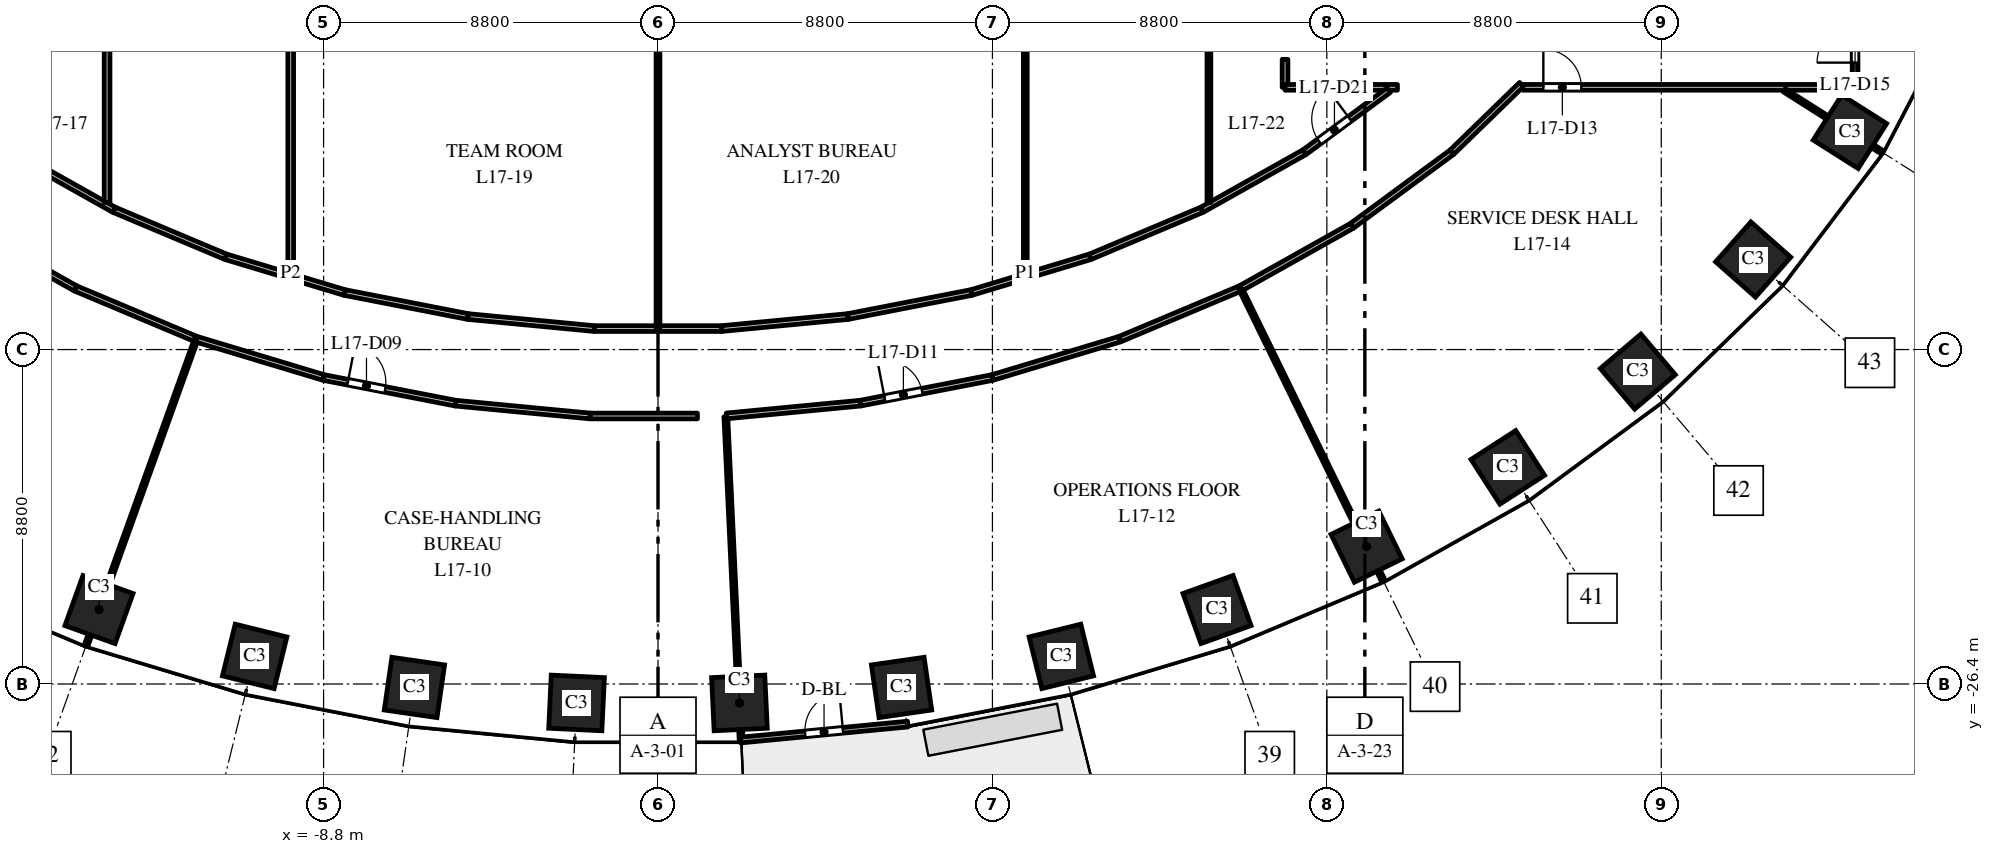
"""IFC4 building model, lengths in metres.
Left out: names, types, materials, properties, quantities, classifications, styles, units other than length and angle.
Written with IfcOpenShell. Run it as: python <this file> out.ifc"""

import sys

from ifc_helpers import new_model, si_unit, direction, frame, frame_2d, origin, origin_2d, place, context, subcontext, project, spatial, rectangle, extrude, element, fill, save


model = new_model("IFC4")
c1 = context("Model", 3, precision=1e-05, world=origin(), true_north=direction((0.0, 1.0)))
c2 = subcontext(c1, "Body", "Model", "MODEL_VIEW")
j1 = project(units=[si_unit("LENGTHUNIT", "METRE"), si_unit("PLANEANGLEUNIT", "RADIAN")], contexts=[c1])
p1 = place(None, origin())
s1 = spatial("IfcSite", under=j1, at=p1, CompositionType="ELEMENT")
p2 = place(p1, origin())
s2 = spatial("IfcBuilding", under=s1, at=p2, CompositionType="ELEMENT")
p3 = place(p2, frame((0.0, 0.0, 78.5)))
s3 = spatial("IfcBuildingStorey", under=s2, at=p3, CompositionType="ELEMENT", Elevation=78.5)
for number, where, z_axis, x_axis in (
    (1, (-14.709, -24.441, 0.0), (0.0, 0.0, 1.0), (0.941, -0.338, 0.0)),
    (2, (-10.613, -25.674, 0.0), (0.0, 0.0, 1.0), (0.971, -0.24, 0.0)),
    (3, (-6.409, -26.491, 0.0), (0.0, 0.0, 1.0), (0.99, -0.143, 0.0)),
    (4, (-2.143, -26.898, 0.0), (0.0, 0.0, 1.0), (0.999, -0.048, 0.0)),
    (5, (2.143, -26.898, 0.0), (0.0, 0.0, 1.0), (0.999, 0.048, 0.0)),
    (6, (6.409, -26.491, 0.0), (0.0, 0.0, 1.0), (0.99, 0.143, 0.0)),
    (7, (10.613, -25.674, 0.0), (0.0, 0.0, 1.0), (0.971, 0.24, 0.0)),
    (8, (14.709, -24.441, 0.0), (0.0, 0.0, 1.0), (0.941, 0.338, 0.0)),
    (9, (18.646, -22.785, 0.0), (0.0, 0.0, 1.0), (0.898, 0.439, 0.0)),
    (10, (22.362, -20.7, 0.0), (0.0, 0.0, 1.0), (0.84, 0.542, 0.0)),
    (11, (25.783, -18.18, 0.0), (0.0, 0.0, 1.0), (0.763, 0.646, 0.0)),
    (12, (28.819, -15.23, 0.0), (0.0, 0.0, 1.0), (0.663, 0.749, 0.0)),
    (13, (31.365, -11.871, 0.0), (0.0, 0.0, 1.0), (0.535, 0.845, 0.0)),
):
    element("IfcColumn", number, at=place(p3, frame(where, z_axis=z_axis, x_axis=x_axis)), inside=s3, PredefinedType="COLUMN", context=c2, shape_type="SweptSolid", body=[
        extrude(rectangle(XDim=1.4, YDim=1.4, at=origin_2d()), origin(), (0.0, 0.0, 1.0), 4.0),
    ])
p4 = place(p3, frame((2.166, -27.875, 0.0), z_axis=(0.0, 0.0, 1.0), x_axis=(0.995473879823, 0.095035543824, 0.0)))
e14 = element("IfcWall", 14, at=p4, inside=s3, PredefinedType="STANDARD", context=c2, shape_type="SweptSolid", body=[
    extrude(rectangle(XDim=4.426, YDim=0.15, at=frame_2d((2.213, 0.0))), origin(), (0.0, 0.0, 1.0), 3.7),
])
p5 = place(p4, frame((1.713, 0.0, 0.0)))
e15 = element("IfcOpeningElement", 15, at=p5, cuts=e14, PredefinedType="OPENING", context=c2, shape_type="SweptSolid", body=[
    extrude(rectangle(XDim=1.0, YDim=2.4, at=frame_2d((0.5, 1.2))), frame((0.0, 0.085, 0.0), z_axis=(0.0, -1.0, 0.0), x_axis=(1.0, 0.0, 0.0)), (0.0, 0.0, 1.0), 0.17),
])
p6 = place(p3, frame((-18.26, -14.344, 0.0), z_axis=(0.0, 0.0, 1.0), x_axis=(0.871958798398, -0.489579262118, 0.0)))
e16 = element("IfcWall", 16, at=p6, inside=s3, PredefinedType="PARTITIONING", context=c2, shape_type="SweptSolid", body=[
    extrude(rectangle(XDim=3.366, YDim=0.15, at=frame_2d((1.683, 0.0))), origin(), (0.0, 0.0, 1.0), 3.7),
])
p7 = place(p3, frame((-17.01, -12.408, 0.0), z_axis=(0.0, 0.0, 1.0), x_axis=(0.871977874087, -0.489545286059, 0.0)))
e17 = element("IfcWall", 17, at=p7, inside=s3, PredefinedType="PARTITIONING", context=c2, shape_type="SweptSolid", body=[
    extrude(rectangle(XDim=3.093, YDim=0.15, at=frame_2d((1.546, 0.0))), origin(), (0.0, 0.0, 1.0), 3.7),
])
p8 = place(p3, frame((-15.325, -15.992, 0.0), z_axis=(0.0, 0.0, 1.0), x_axis=(0.921891448612, -0.387448263612, 0.0)))
e18 = element("IfcWall", 18, at=p8, inside=s3, PredefinedType="PARTITIONING", context=c2, shape_type="SweptSolid", body=[
    extrude(rectangle(XDim=3.443, YDim=0.15, at=frame_2d((1.722, 0.0))), origin(), (0.0, 0.0, 1.0), 2.85),
])
p9 = place(p3, frame((-15.048, -25.383, 0.0), z_axis=(0.0, 0.0, 1.0), x_axis=(0.338300183564, 0.941038248851, 0.0)))
e19 = element("IfcWall", 19, at=p9, inside=s3, PredefinedType="PARTITIONING", context=c2, shape_type="SweptSolid", body=[
    extrude(rectangle(XDim=8.558, YDim=0.1, at=frame_2d((4.279, 0.0))), origin(), (0.0, 0.0, 1.0), 2.85),
])
p10 = place(p3, frame((-14.497, -13.729, 0.0), z_axis=(0.0, 0.0, 1.0), x_axis=(0.0, 1.0, 0.0)))
e20 = element("IfcWall", 20, at=p10, inside=s3, PredefinedType="PARTITIONING", context=c2, shape_type="SweptSolid", body=[
    extrude(rectangle(XDim=4.654, YDim=0.15, at=frame_2d((2.327, 0.0))), origin(), (0.0, 0.0, 1.0), 2.75),
])
p11 = place(p3, frame((-14.313, -13.922, 0.0), z_axis=(0.0, 0.0, 1.0), x_axis=(0.921799502591, -0.387666966638, 0.0)))
e21 = element("IfcWall", 21, at=p11, inside=s3, PredefinedType="PARTITIONING", context=c2, shape_type="SweptSolid", body=[
    extrude(rectangle(XDim=3.19, YDim=0.15, at=frame_2d((1.595, 0.0))), origin(), (0.0, 0.0, 1.0), 2.85),
])
p12 = place(p3, frame((-12.151, -17.326, 0.0), z_axis=(0.0, 0.0, 1.0), x_axis=(0.957528149021, -0.288339806186, 0.0)))
e22 = element("IfcWall", 22, at=p12, inside=s3, PredefinedType="PARTITIONING", context=c2, shape_type="SweptSolid", body=[
    extrude(rectangle(XDim=3.5, YDim=0.15, at=frame_2d((1.75, 0.0))), origin(), (0.0, 0.0, 1.0), 3.7),
])
p13 = place(p3, frame((-11.372, -15.159, 0.0), z_axis=(0.0, 0.0, 1.0), x_axis=(0.95757464185, -0.28818536619, 0.0)))
e23 = element("IfcWall", 23, at=p13, inside=s3, PredefinedType="PARTITIONING", context=c2, shape_type="SweptSolid", body=[
    extrude(rectangle(XDim=3.262, YDim=0.15, at=frame_2d((1.631, 0.0))), origin(), (0.0, 0.0, 1.0), 3.7),
])
p14 = place(p3, frame((-9.665, -15.591, 0.0), z_axis=(0.0, 0.0, 1.0), x_axis=(0.0, 1.0, 0.0)))
e24 = element("IfcWall", 24, at=p14, inside=s3, PredefinedType="PARTITIONING", context=c2, shape_type="SweptSolid", body=[
    extrude(rectangle(XDim=31.182, YDim=0.15, at=frame_2d((15.591, 0.0))), origin(), (0.0, 0.0, 1.0), 2.75),
])
p15 = place(p14, frame((29.572, 0.0, 0.0)))
e25 = element("IfcOpeningElement", 25, at=p15, cuts=e24, PredefinedType="OPENING", context=c2, shape_type="SweptSolid", body=[
    extrude(rectangle(XDim=1.0, YDim=2.1, at=frame_2d((0.5, 1.05))), frame((0.0, 0.085, 0.0), z_axis=(0.0, -1.0, 0.0), x_axis=(1.0, 0.0, 0.0)), (0.0, 0.0, 1.0), 0.17),
])
p16 = place(p3, frame((-8.8, -18.335, 0.0), z_axis=(0.0, 0.0, 1.0), x_axis=(0.981620418387, -0.190843795306, 0.0)))
e26 = element("IfcWall", 26, at=p16, inside=s3, PredefinedType="PARTITIONING", context=c2, shape_type="SweptSolid", body=[
    extrude(rectangle(XDim=3.537, YDim=0.15, at=frame_2d((1.769, 0.0))), origin(), (0.0, 0.0, 1.0), 2.85),
])
p17 = place(p16, frame((0.65, 0.0, 0.0)))
e27 = element("IfcOpeningElement", 27, at=p17, cuts=e26, PredefinedType="OPENING", context=c2, shape_type="SweptSolid", body=[
    extrude(rectangle(XDim=1.0, YDim=2.1, at=frame_2d((0.5, 1.05))), frame((0.0, 0.085, 0.0), z_axis=(0.0, -1.0, 0.0), x_axis=(1.0, 0.0, 0.0)), (0.0, 0.0, 1.0), 0.17),
])
p18 = place(p3, frame((-8.248, -16.099, 0.0), z_axis=(0.0, 0.0, 1.0), x_axis=(0.981621529558, -0.190838079815, 0.0)))
e28 = element("IfcWall", 28, at=p18, inside=s3, PredefinedType="PARTITIONING", context=c2, shape_type="SweptSolid", body=[
    extrude(rectangle(XDim=3.311, YDim=0.15, at=frame_2d((1.655, 0.0))), origin(), (0.0, 0.0, 1.0), 2.85),
])
p19 = place(p3, frame((-5.328, -19.01, 0.0), z_axis=(0.0, 0.0, 1.0), x_axis=(0.995485604231, -0.094912653366, 0.0)))
e29 = element("IfcWall", 29, at=p19, inside=s3, PredefinedType="PARTITIONING", context=c2, shape_type="SweptSolid", body=[
    extrude(rectangle(XDim=3.56, YDim=0.15, at=frame_2d((1.78, 0.0))), origin(), (0.0, 0.0, 1.0), 3.7),
])
p20 = place(p3, frame((-4.998, -16.731, 0.0), z_axis=(0.0, 0.0, 1.0), x_axis=(0.995479356205, -0.094978162593, 0.0)))
e30 = element("IfcWall", 30, at=p20, inside=s3, PredefinedType="PARTITIONING", context=c2, shape_type="SweptSolid", body=[
    extrude(rectangle(XDim=3.339, YDim=0.15, at=frame_2d((1.669, 0.0))), origin(), (0.0, 0.0, 1.0), 3.7),
])
p21 = place(p3, frame((-1.784, -19.348, 0.0), z_axis=(0.0, 0.0, 1.0), x_axis=(1.0, 0.0, 0.0)))
e31 = element("IfcWall", 31, at=p21, inside=s3, PredefinedType="PARTITIONING", context=c2, shape_type="SweptSolid", body=[
    extrude(rectangle(XDim=2.821, YDim=0.15, at=frame_2d((1.411, 0.0))), origin(), (0.0, 0.0, 1.0), 2.85),
])
p22 = place(p3, frame((-1.674, -17.048, 0.0), z_axis=(0.0, 0.0, 1.0), x_axis=(1.0, 0.0, 0.0)))
e32 = element("IfcWall", 32, at=p22, inside=s3, PredefinedType="PARTITIONING", context=c2, shape_type="SweptSolid", body=[
    extrude(rectangle(XDim=1.654, YDim=0.15, at=frame_2d((0.827, 0.0))), origin(), (0.0, 0.0, 1.0), 2.85),
])
p23 = place(p3, frame((0.0, -17.048, 0.0), z_axis=(0.0, 0.0, 1.0), x_axis=(1.0, 0.0, 0.0)))
e33 = element("IfcWall", 33, at=p23, inside=s3, PredefinedType="PARTITIONING", context=c2, shape_type="SweptSolid", body=[
    extrude(rectangle(XDim=1.674, YDim=0.15, at=frame_2d((0.837, 0.0))), origin(), (0.0, 0.0, 1.0), 3.7),
])
p24 = place(p3, frame((0.0, -17.044, 0.0), z_axis=(0.0, 0.0, 1.0), x_axis=(0.0, 1.0, 0.0)))
e34 = element("IfcWall", 34, at=p24, inside=s3, PredefinedType="PARTITIONING", context=c2, shape_type="SweptSolid", body=[
    extrude(rectangle(XDim=9.54, YDim=0.1, at=frame_2d((4.77, 0.0))), origin(), (0.0, 0.0, 1.0), 3.7),
])
p25 = place(p3, frame((1.674, -17.048, 0.0), z_axis=(0.0, 0.0, 1.0), x_axis=(0.995479356205, 0.094978162593, 0.0)))
e35 = element("IfcWall", 35, at=p25, inside=s3, PredefinedType="PARTITIONING", context=c2, shape_type="SweptSolid", body=[
    extrude(rectangle(XDim=3.339, YDim=0.15, at=frame_2d((1.669, 0.0))), origin(), (0.0, 0.0, 1.0), 2.85),
])
p26 = place(p3, frame((1.785, -19.366, 0.0), z_axis=(0.0, 0.0, 1.0), x_axis=(0.047190335266, -0.998885915537, 0.0)))
e36 = element("IfcWall", 36, at=p26, inside=s3, PredefinedType="PARTITIONING", context=c2, shape_type="SweptSolid", body=[
    extrude(rectangle(XDim=8.542, YDim=0.1, at=frame_2d((4.271, 0.0))), origin(), (0.0, 0.0, 1.0), 2.85),
])
p27 = place(p3, frame((1.804, -19.346, 0.0), z_axis=(0.0, 0.0, 1.0), x_axis=(0.99548678928, 0.094900223226, 0.0)))
e37 = element("IfcWall", 37, at=p27, inside=s3, PredefinedType="PARTITIONING", context=c2, shape_type="SweptSolid", body=[
    extrude(rectangle(XDim=3.54, YDim=0.15, at=frame_2d((1.77, 0.0))), origin(), (0.0, 0.0, 1.0), 2.85),
])
p28 = place(p3, frame((4.998, -16.731, 0.0), z_axis=(0.0, 0.0, 1.0), x_axis=(0.981621529558, 0.190838079815, 0.0)))
e38 = element("IfcWall", 38, at=p28, inside=s3, PredefinedType="PARTITIONING", context=c2, shape_type="SweptSolid", body=[
    extrude(rectangle(XDim=3.311, YDim=0.15, at=frame_2d((1.655, 0.0))), origin(), (0.0, 0.0, 1.0), 3.7),
])
p29 = place(p3, frame((5.328, -19.01, 0.0), z_axis=(0.0, 0.0, 1.0), x_axis=(0.981620418387, 0.190843795306, 0.0)))
e39 = element("IfcWall", 39, at=p29, inside=s3, PredefinedType="PARTITIONING", context=c2, shape_type="SweptSolid", body=[
    extrude(rectangle(XDim=3.537, YDim=0.15, at=frame_2d((1.769, 0.0))), origin(), (0.0, 0.0, 1.0), 3.7),
])
p30 = place(p29, frame((0.65, 0.0, 0.0)))
e40 = element("IfcOpeningElement", 40, at=p30, cuts=e39, PredefinedType="OPENING", context=c2, shape_type="SweptSolid", body=[
    extrude(rectangle(XDim=1.0, YDim=2.1, at=frame_2d((0.5, 1.05))), frame((0.0, 0.085, 0.0), z_axis=(0.0, -1.0, 0.0), x_axis=(1.0, 0.0, 0.0)), (0.0, 0.0, 1.0), 0.17),
])
p31 = place(p3, frame((8.248, -16.099, 0.0), z_axis=(0.0, 0.0, 1.0), x_axis=(0.95757464185, 0.28818536619, 0.0)))
e41 = element("IfcWall", 41, at=p31, inside=s3, PredefinedType="PARTITIONING", context=c2, shape_type="SweptSolid", body=[
    extrude(rectangle(XDim=3.262, YDim=0.15, at=frame_2d((1.631, 0.0))), origin(), (0.0, 0.0, 1.0), 2.85),
])
p32 = place(p3, frame((8.8, -18.335, 0.0), z_axis=(0.0, 0.0, 1.0), x_axis=(0.957528149021, 0.288339806186, 0.0)))
e42 = element("IfcWall", 42, at=p32, inside=s3, PredefinedType="PARTITIONING", context=c2, shape_type="SweptSolid", body=[
    extrude(rectangle(XDim=3.5, YDim=0.15, at=frame_2d((1.75, 0.0))), origin(), (0.0, 0.0, 1.0), 2.85),
])
p33 = place(p3, frame((9.665, -15.591, 0.0), z_axis=(0.0, 0.0, 1.0), x_axis=(0.0, 1.0, 0.0)))
e43 = element("IfcWall", 43, at=p33, inside=s3, PredefinedType="PARTITIONING", context=c2, shape_type="SweptSolid", body=[
    extrude(rectangle(XDim=31.182, YDim=0.1, at=frame_2d((15.591, 0.0))), origin(), (0.0, 0.0, 1.0), 2.75),
])
p34 = place(p3, frame((11.372, -15.159, 0.0), z_axis=(0.0, 0.0, 1.0), x_axis=(0.921799502591, 0.387666966638, 0.0)))
e44 = element("IfcWall", 44, at=p34, inside=s3, PredefinedType="PARTITIONING", context=c2, shape_type="SweptSolid", body=[
    extrude(rectangle(XDim=3.19, YDim=0.15, at=frame_2d((1.595, 0.0))), origin(), (0.0, 0.0, 1.0), 3.7),
])
p35 = place(p3, frame((12.151, -17.326, 0.0), z_axis=(0.0, 0.0, 1.0), x_axis=(0.921891448612, 0.387448263612, 0.0)))
e45 = element("IfcWall", 45, at=p35, inside=s3, PredefinedType="PARTITIONING", context=c2, shape_type="SweptSolid", body=[
    extrude(rectangle(XDim=3.443, YDim=0.15, at=frame_2d((1.722, 0.0))), origin(), (0.0, 0.0, 1.0), 3.7),
])
p36 = place(p3, frame((14.313, -13.922, 0.0), z_axis=(0.0, 0.0, 1.0), x_axis=(0.871977874087, 0.489545286059, 0.0)))
e46 = element("IfcWall", 46, at=p36, inside=s3, PredefinedType="PARTITIONING", context=c2, shape_type="SweptSolid", body=[
    extrude(rectangle(XDim=3.093, YDim=0.15, at=frame_2d((1.546, 0.0))), origin(), (0.0, 0.0, 1.0), 3.7),
])
p37 = place(p3, frame((14.497, -13.729, 0.0), z_axis=(0.0, 0.0, 1.0), x_axis=(0.0, 1.0, 0.0)))
e47 = element("IfcWall", 47, at=p37, inside=s3, PredefinedType="PARTITIONING", context=c2, shape_type="SweptSolid", body=[
    extrude(rectangle(XDim=4.654, YDim=0.1, at=frame_2d((2.327, 0.0))), origin(), (0.0, 0.0, 1.0), 3.7),
])
p38 = place(p3, frame((15.326, -15.995, 0.0), z_axis=(0.0, 0.0, 1.0), x_axis=(0.439255658574, -0.898362102056, 0.0)))
e48 = element("IfcWall", 48, at=p38, inside=s3, PredefinedType="PARTITIONING", context=c2, shape_type="SweptSolid", body=[
    extrude(rectangle(XDim=8.56, YDim=0.1, at=frame_2d((4.28, 0.0))), origin(), (0.0, 0.0, 1.0), 2.85),
])
p39 = place(p3, frame((15.342, -15.982, 0.0), z_axis=(0.0, 0.0, 1.0), x_axis=(0.872011649609, 0.48948512025, 0.0)))
e49 = element("IfcWall", 49, at=p39, inside=s3, PredefinedType="PARTITIONING", context=c2, shape_type="SweptSolid", body=[
    extrude(rectangle(XDim=3.346, YDim=0.15, at=frame_2d((1.673, 0.0))), origin(), (0.0, 0.0, 1.0), 3.7),
])
p40 = place(p3, frame((16.5, -10.7, 0.0), z_axis=(0.0, 0.0, 1.0), x_axis=(0.0, 1.0, 0.0)))
e50 = element("IfcWall", 50, at=p40, inside=s3, PredefinedType="PARTITIONING", context=c2, shape_type="SweptSolid", body=[
    extrude(rectangle(XDim=0.736, YDim=0.15, at=frame_2d((0.368, 0.0))), origin(), (0.0, 0.0, 1.0), 3.7),
])
p41 = place(p3, frame((16.5, -10.7, 0.0), z_axis=(0.0, 0.0, 1.0), x_axis=(1.0, 0.0, 0.0)))
e51 = element("IfcWall", 51, at=p41, inside=s3, PredefinedType="PARTITIONING", context=c2, shape_type="SweptSolid", body=[
    extrude(rectangle(XDim=2.957, YDim=0.15, at=frame_2d((1.479, 0.0))), origin(), (0.0, 0.0, 1.0), 3.7),
])
p42 = place(p3, frame((17.01, -12.408, 0.0), z_axis=(0.0, 0.0, 1.0), x_axis=(0.805276342361, 0.592899664728, 0.0)))
e52 = element("IfcWall", 52, at=p42, inside=s3, PredefinedType="PARTITIONING", context=c2, shape_type="SweptSolid", body=[
    extrude(rectangle(XDim=2.754, YDim=0.15, at=frame_2d((1.377, 0.0))), origin(), (0.0, 0.0, 1.0), 3.7),
])
p43 = place(p42, frame((0.481, 0.0, 0.0)))
e53 = element("IfcOpeningElement", 53, at=p43, cuts=e52, PredefinedType="OPENING", context=c2, shape_type="SweptSolid", body=[
    extrude(rectangle(XDim=1.0, YDim=2.1, at=frame_2d((0.5, 1.05))), frame((0.0, 0.085, 0.0), z_axis=(0.0, -1.0, 0.0), x_axis=(1.0, 0.0, 0.0)), (0.0, 0.0, 1.0), 0.17),
])
p44 = place(p3, frame((18.26, -14.344, 0.0), z_axis=(0.0, 0.0, 1.0), x_axis=(0.805303685339, 0.592862525701, 0.0)))
e54 = element("IfcWall", 54, at=p44, inside=s3, PredefinedType="PARTITIONING", context=c2, shape_type="SweptSolid", body=[
    extrude(rectangle(XDim=3.267, YDim=0.15, at=frame_2d((1.634, 0.0))), origin(), (0.0, 0.0, 1.0), 3.7),
])
p45 = place(p3, frame((20.891, -12.407, 0.0), z_axis=(0.0, 0.0, 1.0), x_axis=(0.71701613235, 0.697056572991, 0.0)))
e55 = element("IfcWall", 55, at=p45, inside=s3, PredefinedType="PARTITIONING", context=c2, shape_type="SweptSolid", body=[
    extrude(rectangle(XDim=2.556, YDim=0.15, at=frame_2d((1.278, 0.0))), origin(), (0.0, 0.0, 1.0), 2.75),
])
p46 = place(p3, frame((22.755, -10.7, 0.0), z_axis=(0.0, 0.0, 1.0), x_axis=(1.0, 0.0, 0.0)))
e56 = element("IfcWall", 56, at=p46, inside=s3, PredefinedType="PARTITIONING", context=c2, shape_type="SweptSolid", body=[
    extrude(rectangle(XDim=8.745, YDim=0.15, at=frame_2d((4.373, 0.0))), origin(), (0.0, 0.0, 1.0), 2.85),
])
p47 = place(p46, frame((0.542, 0.0, 0.0)))
e57 = element("IfcOpeningElement", 57, at=p47, cuts=e56, PredefinedType="OPENING", context=c2, shape_type="SweptSolid", body=[
    extrude(rectangle(XDim=1.0, YDim=2.1, at=frame_2d((0.5, 1.05))), frame((0.0, 0.085, 0.0), z_axis=(0.0, -1.0, 0.0), x_axis=(1.0, 0.0, 0.0)), (0.0, 0.0, 1.0), 0.17),
])
p48 = place(p3, frame((29.637, -10.777, 0.0), z_axis=(0.0, 0.0, 1.0), x_axis=(0.844810627195, -0.535065420467, 0.0)))
e58 = element("IfcWall", 58, at=p48, inside=s3, PredefinedType="PARTITIONING", context=c2, shape_type="SweptSolid", body=[
    extrude(rectangle(XDim=3.048, YDim=0.1, at=frame_2d((1.524, 0.0))), origin(), (0.0, 0.0, 1.0), 2.85),
])
p49 = place(p3, frame((31.5, -10.7, 0.0), z_axis=(0.0, 0.0, 1.0), x_axis=(0.0, 1.0, 0.0)))
e59 = element("IfcWall", 59, at=p49, inside=s3, PredefinedType="PARTITIONING", context=c2, shape_type="SweptSolid", body=[
    extrude(rectangle(XDim=2.2, YDim=0.15, at=frame_2d((1.1, 0.0))), origin(), (0.0, 0.0, 1.0), 2.85),
])
p50 = place(p49, frame((0.65, 0.0, 0.0)))
e60 = element("IfcOpeningElement", 60, at=p50, cuts=e59, PredefinedType="OPENING", context=c2, shape_type="SweptSolid", body=[
    extrude(rectangle(XDim=1.0, YDim=2.1, at=frame_2d((0.5, 1.05))), frame((0.0, 0.085, 0.0), z_axis=(0.0, -1.0, 0.0), x_axis=(1.0, 0.0, 0.0)), (0.0, 0.0, 1.0), 0.17),
])
p51 = place(p5, origin())
e61 = element("IfcDoor", 61, at=p51, inside=s3, OperationType="SINGLE_SWING_RIGHT", PredefinedType="DOOR", context=c2, shape_type="SweptSolid", body=[
    extrude(rectangle(XDim=1.0, YDim=2.4, at=frame_2d((0.5, 1.2))), frame((0.0, 0.025, 0.0), z_axis=(0.0, -1.0, 0.0), x_axis=(1.0, 0.0, 0.0)), (0.0, 0.0, 1.0), 0.05),
])
fill(e15, e61)
p52 = place(p17, origin())
e62 = element("IfcDoor", 62, at=p52, inside=s3, OperationType="SINGLE_SWING_LEFT", PredefinedType="DOOR", context=c2, shape_type="SweptSolid", body=[
    extrude(rectangle(XDim=1.0, YDim=2.1, at=frame_2d((0.5, 1.05))), frame((0.0, 0.025, 0.0), z_axis=(0.0, -1.0, 0.0), x_axis=(1.0, 0.0, 0.0)), (0.0, 0.0, 1.0), 0.05),
])
fill(e27, e62)
p53 = place(p30, origin())
e63 = element("IfcDoor", 63, at=p53, inside=s3, OperationType="SINGLE_SWING_LEFT", PredefinedType="DOOR", context=c2, shape_type="SweptSolid", body=[
    extrude(rectangle(XDim=1.0, YDim=2.1, at=frame_2d((0.5, 1.05))), frame((0.0, 0.025, 0.0), z_axis=(0.0, -1.0, 0.0), x_axis=(1.0, 0.0, 0.0)), (0.0, 0.0, 1.0), 0.05),
])
fill(e40, e63)
p54 = place(p47, origin())
e64 = element("IfcDoor", 64, at=p54, inside=s3, OperationType="SINGLE_SWING_LEFT", PredefinedType="DOOR", context=c2, shape_type="SweptSolid", body=[
    extrude(rectangle(XDim=1.0, YDim=2.1, at=frame_2d((0.5, 1.05))), frame((0.0, 0.025, 0.0), z_axis=(0.0, -1.0, 0.0), x_axis=(1.0, 0.0, 0.0)), (0.0, 0.0, 1.0), 0.05),
])
fill(e57, e64)
p55 = place(p50, origin())
e65 = element("IfcDoor", 65, at=p55, inside=s3, OperationType="SINGLE_SWING_LEFT", PredefinedType="DOOR", context=c2, shape_type="SweptSolid", body=[
    extrude(rectangle(XDim=1.0, YDim=2.1, at=frame_2d((0.5, 1.05))), frame((0.0, 0.025, 0.0), z_axis=(0.0, -1.0, 0.0), x_axis=(1.0, 0.0, 0.0)), (0.0, 0.0, 1.0), 0.05),
])
fill(e60, e65)
p56 = place(p43, origin())
e66 = element("IfcDoor", 66, at=p56, inside=s3, OperationType="SINGLE_SWING_RIGHT", PredefinedType="DOOR", context=c2, shape_type="SweptSolid", body=[
    extrude(rectangle(XDim=1.0, YDim=2.1, at=frame_2d((0.5, 1.05))), frame((0.0, 0.025, 0.0), z_axis=(0.0, -1.0, 0.0), x_axis=(1.0, 0.0, 0.0)), (0.0, 0.0, 1.0), 0.05),
])
fill(e53, e66)
save(model, sys.argv[1])
